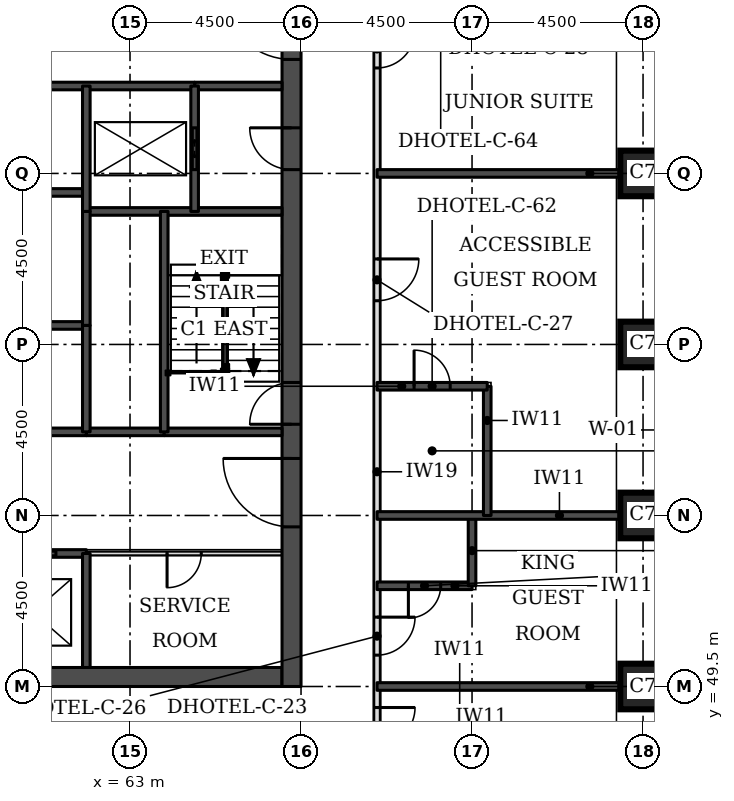
"""IFC4 building model, lengths in metres.
Left out: names, types, materials, properties, quantities, classifications, styles, units other than length and angle.
Written with IfcOpenShell. Run it as: python <this file> out.ifc"""

import sys

from ifc_helpers import new_model, si_unit, direction, frame, frame_2d, origin, origin_2d, place, context, subcontext, project, spatial, rectangle, extrude, element, fill, save


model = new_model("IFC4")
c1 = context("Model", 3, precision=1e-05, world=origin(), true_north=direction((0.0, 1.0)))
c2 = subcontext(c1, "Body", "Model", "MODEL_VIEW")
j1 = project(units=[si_unit("LENGTHUNIT", "METRE"), si_unit("PLANEANGLEUNIT", "RADIAN")], contexts=[c1])
p1 = place(None, origin())
s1 = spatial("IfcSite", under=j1, at=p1, CompositionType="ELEMENT")
p2 = place(p1, origin())
s2 = spatial("IfcBuilding", under=s1, at=p2, CompositionType="ELEMENT")
p3 = place(p2, frame((0.0, 0.0, 33.0)))
s3 = spatial("IfcBuildingStorey", under=s2, at=p3, CompositionType="ELEMENT", Elevation=33.0)
for number, where, z_axis, x_axis in (
    (1, (76.5, 49.5, 0.0), (0.0, 0.0, 1.0), (1.0, 0.0, 0.0)),
    (2, (76.5, 54.0, 0.0), (0.0, 0.0, 1.0), (1.0, 0.0, 0.0)),
    (3, (76.5, 58.5, 0.0), (0.0, 0.0, 1.0), (1.0, 0.0, 0.0)),
    (4, (76.5, 63.0, 0.0), (0.0, 0.0, 1.0), (1.0, 0.0, 0.0)),
):
    element("IfcColumn", number, at=place(p3, frame(where, z_axis=z_axis, x_axis=x_axis)), inside=s3, PredefinedType="COLUMN", context=c2, shape_type="SweptSolid", body=[
        extrude(rectangle(XDim=1.2, YDim=1.2, at=origin_2d()), origin(), (0.0, 0.0, 1.0), 3.3),
    ])
p4 = place(p3, frame((45.5, 49.75, 0.0), z_axis=(0.0, 0.0, 1.0), x_axis=(1.0, 0.0, 0.0)))
e5 = element("IfcWall", 5, at=p4, inside=s3, PredefinedType="SHEAR", context=c2, shape_type="SweptSolid", body=[
    extrude(rectangle(XDim=21.5, YDim=0.5, at=frame_2d((10.75, 0.0))), origin(), (0.0, 0.0, 1.0), 3.3),
])
p5 = place(p3, frame((67.25, 49.5, 0.0), z_axis=(0.0, 0.0, 1.0), x_axis=(0.0, 1.0, 0.0)))
e6 = element("IfcWall", 6, at=p5, inside=s3, PredefinedType="SHEAR", context=c2, shape_type="SweptSolid", body=[
    extrude(rectangle(XDim=22.5, YDim=0.5, at=frame_2d((11.25, 0.0))), origin(), (0.0, 0.0, 1.0), 3.3),
])
p6 = place(p5, frame((4.2, 0.0, 0.0)))
e7 = element("IfcOpeningElement", 7, at=p6, cuts=e6, PredefinedType="OPENING", context=c2, shape_type="SweptSolid", body=[
    extrude(rectangle(XDim=1.8, YDim=2.1, at=frame_2d((0.9, 1.05))), frame((0.0, 0.26, 0.0), z_axis=(0.0, -1.0, 0.0), x_axis=(1.0, 0.0, 0.0)), (0.0, 0.0, 1.0), 0.52),
])
p7 = place(p5, frame((6.9, 0.0, 0.0)))
e8 = element("IfcOpeningElement", 8, at=p7, cuts=e6, PredefinedType="OPENING", context=c2, shape_type="SweptSolid", body=[
    extrude(rectangle(XDim=1.1, YDim=2.1, at=frame_2d((0.55, 1.05))), frame((0.0, 0.26, 0.0), z_axis=(0.0, -1.0, 0.0), x_axis=(1.0, 0.0, 0.0)), (0.0, 0.0, 1.0), 0.52),
])
p8 = place(p5, frame((13.6, 0.0, 0.0)))
e9 = element("IfcOpeningElement", 9, at=p8, cuts=e6, PredefinedType="OPENING", context=c2, shape_type="SweptSolid", body=[
    extrude(rectangle(XDim=1.1, YDim=2.1, at=frame_2d((0.55, 1.05))), frame((0.0, 0.26, 0.0), z_axis=(0.0, -1.0, 0.0), x_axis=(1.0, 0.0, 0.0)), (0.0, 0.0, 1.0), 0.52),
])
p9 = place(p5, frame((16.5, 0.0, 0.0)))
e10 = element("IfcOpeningElement", 10, at=p9, cuts=e6, PredefinedType="OPENING", context=c2, shape_type="SweptSolid", body=[
    extrude(rectangle(XDim=1.8, YDim=2.1, at=frame_2d((0.9, 1.05))), frame((0.0, 0.26, 0.0), z_axis=(0.0, -1.0, 0.0), x_axis=(1.0, 0.0, 0.0)), (0.0, 0.0, 1.0), 0.52),
])
p10 = place(p3, frame((69.5, 47.5, 0.0), z_axis=(0.0, 0.0, 1.0), x_axis=(0.0, 1.0, 0.0)))
e11 = element("IfcWall", 11, at=p10, inside=s3, PredefinedType="PARTITIONING", context=c2, shape_type="SweptSolid", body=[
    extrude(rectangle(XDim=26.5, YDim=0.15, at=frame_2d((13.25, 0.0))), origin(), (0.0, 0.0, 1.0), 3.08),
])
p11 = place(p10, frame((25.053, 0.0, 0.0)))
e12 = element("IfcOpeningElement", 12, at=p11, cuts=e11, PredefinedType="OPENING", context=c2, shape_type="SweptSolid", body=[
    extrude(rectangle(XDim=1.0, YDim=2.1, at=frame_2d((0.5, 1.05))), frame((0.0, 0.085, 0.0), z_axis=(0.0, -1.0, 0.0), x_axis=(1.0, 0.0, 0.0)), (0.0, 0.0, 1.0), 0.17),
])
p12 = place(p10, frame((18.275, 0.0, 0.0)))
e13 = element("IfcOpeningElement", 13, at=p12, cuts=e11, PredefinedType="OPENING", context=c2, shape_type="SweptSolid", body=[
    extrude(rectangle(XDim=1.0, YDim=2.1, at=frame_2d((0.5, 1.05))), frame((0.0, 0.085, 0.0), z_axis=(0.0, -1.0, 0.0), x_axis=(1.0, 0.0, 0.0)), (0.0, 0.0, 1.0), 0.17),
])
p13 = place(p10, frame((12.15, 0.0, 0.0)))
e14 = element("IfcOpeningElement", 14, at=p13, cuts=e11, PredefinedType="OPENING", context=c2, shape_type="SweptSolid", body=[
    extrude(rectangle(XDim=1.1, YDim=2.1, at=frame_2d((0.55, 1.05))), frame((0.0, 0.085, 0.0), z_axis=(0.0, -1.0, 0.0), x_axis=(1.0, 0.0, 0.0)), (0.0, 0.0, 1.0), 0.17),
])
p14 = place(p10, frame((2.825, 0.0, 0.0)))
e15 = element("IfcOpeningElement", 15, at=p14, cuts=e11, PredefinedType="OPENING", context=c2, shape_type="SweptSolid", body=[
    extrude(rectangle(XDim=1.0, YDim=2.1, at=frame_2d((0.5, 1.05))), frame((0.0, 0.085, 0.0), z_axis=(0.0, -1.0, 0.0), x_axis=(1.0, 0.0, 0.0)), (0.0, 0.0, 1.0), 0.17),
])
p15 = place(p10, frame((0.447, 0.0, 0.0)))
e16 = element("IfcOpeningElement", 16, at=p15, cuts=e11, PredefinedType="OPENING", context=c2, shape_type="SweptSolid", body=[
    extrude(rectangle(XDim=1.0, YDim=2.1, at=frame_2d((0.5, 1.05))), frame((0.0, 0.085, 0.0), z_axis=(0.0, -1.0, 0.0), x_axis=(1.0, 0.0, 0.0)), (0.0, 0.0, 1.0), 0.17),
])
p16 = place(p3, frame((69.5, 49.5, 0.0), z_axis=(0.0, 0.0, 1.0), x_axis=(1.0, 0.0, 0.0)))
e17 = element("IfcWall", 17, at=p16, inside=s3, PredefinedType="SOLIDWALL", context=c2, shape_type="SweptSolid", body=[
    extrude(rectangle(XDim=6.4, YDim=0.2, at=frame_2d((3.2, 0.0))), origin(), (0.0, 0.0, 1.0), 3.08),
])
p17 = place(p3, frame((69.5, 52.15, 0.0), z_axis=(0.0, 0.0, 1.0), x_axis=(1.0, 0.0, 0.0)))
e18 = element("IfcWall", 18, at=p17, inside=s3, PredefinedType="SOLIDWALL", context=c2, shape_type="SweptSolid", body=[
    extrude(rectangle(XDim=2.5, YDim=0.2, at=frame_2d((1.25, 0.0))), origin(), (0.0, 0.0, 1.0), 3.08),
])
p18 = place(p17, frame((0.825, 0.0, 0.0)))
e19 = element("IfcOpeningElement", 19, at=p18, cuts=e18, PredefinedType="OPENING", context=c2, shape_type="SweptSolid", body=[
    extrude(rectangle(XDim=0.85, YDim=2.1, at=frame_2d((0.425, 1.05))), frame((0.0, 0.11, 0.0), z_axis=(0.0, -1.0, 0.0), x_axis=(1.0, 0.0, 0.0)), (0.0, 0.0, 1.0), 0.22),
])
p19 = place(p3, frame((72.0, 52.15, 0.0), z_axis=(0.0, 0.0, 1.0), x_axis=(0.0, 1.0, 0.0)))
e20 = element("IfcWall", 20, at=p19, inside=s3, PredefinedType="SOLIDWALL", context=c2, shape_type="SweptSolid", body=[
    extrude(rectangle(XDim=1.85, YDim=0.2, at=frame_2d((0.925, 0.0))), origin(), (0.0, 0.0, 1.0), 3.08),
])
p20 = place(p3, frame((69.5, 54.0, 0.0), z_axis=(0.0, 0.0, 1.0), x_axis=(1.0, 0.0, 0.0)))
e21 = element("IfcWall", 21, at=p20, inside=s3, PredefinedType="SOLIDWALL", context=c2, shape_type="SweptSolid", body=[
    extrude(rectangle(XDim=6.4, YDim=0.2, at=frame_2d((3.2, 0.0))), origin(), (0.0, 0.0, 1.0), 3.08),
])
p21 = place(p3, frame((72.4, 54.0, 0.0), z_axis=(0.0, 0.0, 1.0), x_axis=(0.0, 1.0, 0.0)))
e22 = element("IfcWall", 22, at=p21, inside=s3, PredefinedType="SOLIDWALL", context=c2, shape_type="SweptSolid", body=[
    extrude(rectangle(XDim=3.4, YDim=0.2, at=frame_2d((1.7, 0.0))), origin(), (0.0, 0.0, 1.0), 3.08),
])
p22 = place(p3, frame((69.5, 57.4, 0.0), z_axis=(0.0, 0.0, 1.0), x_axis=(1.0, 0.0, 0.0)))
e23 = element("IfcWall", 23, at=p22, inside=s3, PredefinedType="SOLIDWALL", context=c2, shape_type="SweptSolid", body=[
    extrude(rectangle(XDim=2.9, YDim=0.2, at=frame_2d((1.45, 0.0))), origin(), (0.0, 0.0, 1.0), 3.08),
])
p23 = place(p22, frame((0.975, 0.0, 0.0)))
e24 = element("IfcOpeningElement", 24, at=p23, cuts=e23, PredefinedType="OPENING", context=c2, shape_type="SweptSolid", body=[
    extrude(rectangle(XDim=0.95, YDim=2.1, at=frame_2d((0.475, 1.05))), frame((0.0, 0.11, 0.0), z_axis=(0.0, -1.0, 0.0), x_axis=(1.0, 0.0, 0.0)), (0.0, 0.0, 1.0), 0.22),
])
p24 = place(p3, frame((69.5, 63.0, 0.0), z_axis=(0.0, 0.0, 1.0), x_axis=(1.0, 0.0, 0.0)))
e25 = element("IfcWall", 25, at=p24, inside=s3, PredefinedType="SOLIDWALL", context=c2, shape_type="SweptSolid", body=[
    extrude(rectangle(XDim=6.4, YDim=0.2, at=frame_2d((3.2, 0.0))), origin(), (0.0, 0.0, 1.0), 3.08),
])
p25 = place(p3, frame((61.85, 53.0, 0.0), z_axis=(0.0, 0.0, 1.0), x_axis=(1.0, 0.0, 0.0)))
e26 = element("IfcWall", 26, at=p25, inside=s3, PredefinedType="PARTITIONING", context=c2, shape_type="SweptSolid", body=[
    extrude(rectangle(XDim=5.15, YDim=0.1, at=frame_2d((2.575, 0.0))), origin(), (0.0, 0.0, 1.0), 3.08),
])
p26 = place(p25, frame((2.125, 0.0, 0.0)))
e27 = element("IfcOpeningElement", 27, at=p26, cuts=e26, PredefinedType="OPENING", context=c2, shape_type="SweptSolid", body=[
    extrude(rectangle(XDim=0.9, YDim=2.1, at=frame_2d((0.45, 1.05))), frame((0.0, 0.06, 0.0), z_axis=(0.0, -1.0, 0.0), x_axis=(1.0, 0.0, 0.0)), (0.0, 0.0, 1.0), 0.12),
])
p27 = place(p3, frame((50.65, 53.0, 0.0), z_axis=(0.0, 0.0, 1.0), x_axis=(1.0, 0.0, 0.0)))
e28 = element("IfcWall", 28, at=p27, inside=s3, PredefinedType="SOLIDWALL", context=c2, shape_type="SweptSolid", body=[
    extrude(rectangle(XDim=11.2, YDim=0.2, at=frame_2d((5.6, 0.0))), origin(), (0.0, 0.0, 1.0), 3.08),
])
p28 = place(p27, frame((0.8, 0.0, 0.0)))
e29 = element("IfcOpeningElement", 29, at=p28, cuts=e28, PredefinedType="OPENING", context=c2, shape_type="SweptSolid", body=[
    extrude(rectangle(XDim=1.2, YDim=2.1, at=frame_2d((0.6, 1.05))), frame((0.0, 0.11, 0.0), z_axis=(0.0, -1.0, 0.0), x_axis=(1.0, 0.0, 0.0)), (0.0, 0.0, 1.0), 0.22),
])
p29 = place(p27, frame((3.6, 0.0, 0.0)))
e30 = element("IfcOpeningElement", 30, at=p29, cuts=e28, PredefinedType="OPENING", context=c2, shape_type="SweptSolid", body=[
    extrude(rectangle(XDim=1.2, YDim=2.1, at=frame_2d((0.6, 1.05))), frame((0.0, 0.11, 0.0), z_axis=(0.0, -1.0, 0.0), x_axis=(1.0, 0.0, 0.0)), (0.0, 0.0, 1.0), 0.22),
])
p30 = place(p27, frame((6.4, 0.0, 0.0)))
e31 = element("IfcOpeningElement", 31, at=p30, cuts=e28, PredefinedType="OPENING", context=c2, shape_type="SweptSolid", body=[
    extrude(rectangle(XDim=1.2, YDim=2.1, at=frame_2d((0.6, 1.05))), frame((0.0, 0.11, 0.0), z_axis=(0.0, -1.0, 0.0), x_axis=(1.0, 0.0, 0.0)), (0.0, 0.0, 1.0), 0.22),
])
p31 = place(p27, frame((9.2, 0.0, 0.0)))
e32 = element("IfcOpeningElement", 32, at=p31, cuts=e28, PredefinedType="OPENING", context=c2, shape_type="SweptSolid", body=[
    extrude(rectangle(XDim=1.2, YDim=2.1, at=frame_2d((0.6, 1.05))), frame((0.0, 0.11, 0.0), z_axis=(0.0, -1.0, 0.0), x_axis=(1.0, 0.0, 0.0)), (0.0, 0.0, 1.0), 0.22),
])
p32 = place(p3, frame((61.85, 56.2, 0.0), z_axis=(0.0, 0.0, 1.0), x_axis=(1.0, 0.0, 0.0)))
e33 = element("IfcWall", 33, at=p32, inside=s3, PredefinedType="SOLIDWALL", context=c2, shape_type="SweptSolid", body=[
    extrude(rectangle(XDim=2.05, YDim=0.2, at=frame_2d((1.025, 0.0))), origin(), (0.0, 0.0, 1.0), 3.08),
])
p33 = place(p3, frame((50.65, 56.2, 0.0), z_axis=(0.0, 0.0, 1.0), x_axis=(1.0, 0.0, 0.0)))
e34 = element("IfcWall", 34, at=p33, inside=s3, PredefinedType="SOLIDWALL", context=c2, shape_type="SweptSolid", body=[
    extrude(rectangle(XDim=11.2, YDim=0.2, at=frame_2d((5.6, 0.0))), origin(), (0.0, 0.0, 1.0), 3.08),
])
p34 = place(p3, frame((63.9, 56.2, 0.0), z_axis=(0.0, 0.0, 1.0), x_axis=(1.0, 0.0, 0.0)))
e35 = element("IfcWall", 35, at=p34, inside=s3, PredefinedType="SOLIDWALL", context=c2, shape_type="SweptSolid", body=[
    extrude(rectangle(XDim=3.1, YDim=0.2, at=frame_2d((1.55, 0.0))), origin(), (0.0, 0.0, 1.0), 3.08),
])
p35 = place(p3, frame((50.65, 59.0, 0.0), z_axis=(0.0, 0.0, 1.0), x_axis=(1.0, 0.0, 0.0)))
e36 = element("IfcWall", 36, at=p35, inside=s3, PredefinedType="SOLIDWALL", context=c2, shape_type="SweptSolid", body=[
    extrude(rectangle(XDim=11.2, YDim=0.2, at=frame_2d((5.6, 0.0))), origin(), (0.0, 0.0, 1.0), 3.3),
])
p36 = place(p3, frame((61.85, 62.0, 0.0), z_axis=(0.0, 0.0, 1.0), x_axis=(1.0, 0.0, 0.0)))
e37 = element("IfcWall", 37, at=p36, inside=s3, PredefinedType="SOLIDWALL", context=c2, shape_type="SweptSolid", body=[
    extrude(rectangle(XDim=5.15, YDim=0.2, at=frame_2d((2.575, 0.0))), origin(), (0.0, 0.0, 1.0), 3.08),
])
p37 = place(p3, frame((50.65, 62.5, 0.0), z_axis=(0.0, 0.0, 1.0), x_axis=(1.0, 0.0, 0.0)))
e38 = element("IfcWall", 38, at=p37, inside=s3, PredefinedType="SOLIDWALL", context=c2, shape_type="SweptSolid", body=[
    extrude(rectangle(XDim=11.2, YDim=0.2, at=frame_2d((5.6, 0.0))), origin(), (0.0, 0.0, 1.0), 3.3),
])
p38 = place(p3, frame((64.7, 65.3, 0.0), z_axis=(0.0, 0.0, 1.0), x_axis=(1.0, 0.0, 0.0)))
e39 = element("IfcWall", 39, at=p38, inside=s3, PredefinedType="SOLIDWALL", context=c2, shape_type="SweptSolid", body=[
    extrude(rectangle(XDim=2.3, YDim=0.2, at=frame_2d((1.15, 0.0))), origin(), (0.0, 0.0, 1.0), 3.08),
])
p39 = place(p3, frame((47.8, 65.3, 0.0), z_axis=(0.0, 0.0, 1.0), x_axis=(1.0, 0.0, 0.0)))
e40 = element("IfcWall", 40, at=p39, inside=s3, PredefinedType="SOLIDWALL", context=c2, shape_type="SweptSolid", body=[
    extrude(rectangle(XDim=16.9, YDim=0.2, at=frame_2d((8.45, 0.0))), origin(), (0.0, 0.0, 1.0), 3.08),
])
p40 = place(p3, frame((61.85, 59.0, 0.0), z_axis=(0.0, 0.0, 1.0), x_axis=(0.0, 1.0, 0.0)))
e41 = element("IfcWall", 41, at=p40, inside=s3, PredefinedType="SOLIDWALL", context=c2, shape_type="SweptSolid", body=[
    extrude(rectangle(XDim=3.0, YDim=0.2, at=frame_2d((1.5, 0.0))), origin(), (0.0, 0.0, 1.0), 3.3),
])
p41 = place(p3, frame((61.85, 50.0, 0.0), z_axis=(0.0, 0.0, 1.0), x_axis=(0.0, 1.0, 0.0)))
e42 = element("IfcWall", 42, at=p41, inside=s3, PredefinedType="SOLIDWALL", context=c2, shape_type="SweptSolid", body=[
    extrude(rectangle(XDim=3.0, YDim=0.2, at=frame_2d((1.5, 0.0))), origin(), (0.0, 0.0, 1.0), 3.08),
])
p42 = place(p3, frame((61.85, 56.2, 0.0), z_axis=(0.0, 0.0, 1.0), x_axis=(0.0, 1.0, 0.0)))
e43 = element("IfcWall", 43, at=p42, inside=s3, PredefinedType="SOLIDWALL", context=c2, shape_type="SweptSolid", body=[
    extrude(rectangle(XDim=2.8, YDim=0.2, at=frame_2d((1.4, 0.0))), origin(), (0.0, 0.0, 1.0), 3.08),
])
p43 = place(p3, frame((61.85, 62.0, 0.0), z_axis=(0.0, 0.0, 1.0), x_axis=(0.0, 1.0, 0.0)))
e44 = element("IfcWall", 44, at=p43, inside=s3, PredefinedType="SOLIDWALL", context=c2, shape_type="SweptSolid", body=[
    extrude(rectangle(XDim=3.3, YDim=0.2, at=frame_2d((1.65, 0.0))), origin(), (0.0, 0.0, 1.0), 3.08),
])
p44 = place(p3, frame((63.9, 56.2, 0.0), z_axis=(0.0, 0.0, 1.0), x_axis=(0.0, 1.0, 0.0)))
e45 = element("IfcWall", 45, at=p44, inside=s3, PredefinedType="SOLIDWALL", context=c2, shape_type="SweptSolid", body=[
    extrude(rectangle(XDim=5.8, YDim=0.2, at=frame_2d((2.9, 0.0))), origin(), (0.0, 0.0, 1.0), 3.08),
])
p45 = place(p3, frame((64.7, 62.0, 0.0), z_axis=(0.0, 0.0, 1.0), x_axis=(0.0, 1.0, 0.0)))
e46 = element("IfcWall", 46, at=p45, inside=s3, PredefinedType="SOLIDWALL", context=c2, shape_type="SweptSolid", body=[
    extrude(rectangle(XDim=3.3, YDim=0.2, at=frame_2d((1.65, 0.0))), origin(), (0.0, 0.0, 1.0), 3.08),
])
p46 = place(p45, frame((1.1, 0.0, 0.0)))
e47 = element("IfcOpeningElement", 47, at=p46, cuts=e46, PredefinedType="OPENING", context=c2, shape_type="SweptSolid", body=[
    extrude(rectangle(XDim=1.1, YDim=2.1, at=frame_2d((0.55, 1.05))), frame((0.0, 0.11, 0.0), z_axis=(0.0, -1.0, 0.0), x_axis=(1.0, 0.0, 0.0)), (0.0, 0.0, 1.0), 0.22),
])
p47 = place(p12, frame((1.0, 0.0, 0.0), z_axis=(0.0, 0.0, 1.0), x_axis=(-1.0, 0.0, 0.0)))
e48 = element("IfcDoor", 48, at=p47, inside=s3, OperationType="SINGLE_SWING_LEFT", PredefinedType="DOOR", context=c2, shape_type="SweptSolid", body=[
    extrude(rectangle(XDim=1.0, YDim=2.1, at=frame_2d((0.5, 1.05))), frame((0.0, 0.025, 0.0), z_axis=(0.0, -1.0, 0.0), x_axis=(1.0, 0.0, 0.0)), (0.0, 0.0, 1.0), 0.05),
])
fill(e13, e48)
p48 = place(p13, frame((1.1, 0.0, 0.0), z_axis=(0.0, 0.0, 1.0), x_axis=(-1.0, 0.0, 0.0)))
e49 = element("IfcDoor", 49, at=p48, inside=s3, OperationType="SINGLE_SWING_LEFT", PredefinedType="DOOR", context=c2, shape_type="SweptSolid", body=[
    extrude(rectangle(XDim=1.1, YDim=2.1, at=frame_2d((0.55, 1.05))), frame((0.0, 0.025, 0.0), z_axis=(0.0, -1.0, 0.0), x_axis=(1.0, 0.0, 0.0)), (0.0, 0.0, 1.0), 0.05),
])
fill(e14, e49)
p49 = place(p23, origin())
e50 = element("IfcDoor", 50, at=p49, inside=s3, OperationType="SINGLE_SWING_LEFT", PredefinedType="DOOR", context=c2, shape_type="SweptSolid", body=[
    extrude(rectangle(XDim=0.95, YDim=2.1, at=frame_2d((0.475, 1.05))), frame((0.0, 0.025, 0.0), z_axis=(0.0, -1.0, 0.0), x_axis=(1.0, 0.0, 0.0)), (0.0, 0.0, 1.0), 0.05),
])
fill(e24, e50)
p50 = place(p14, frame((1.0, 0.0, 0.0), z_axis=(0.0, 0.0, 1.0), x_axis=(-1.0, 0.0, 0.0)))
e51 = element("IfcDoor", 51, at=p50, inside=s3, OperationType="SINGLE_SWING_LEFT", PredefinedType="DOOR", context=c2, shape_type="SweptSolid", body=[
    extrude(rectangle(XDim=1.0, YDim=2.1, at=frame_2d((0.5, 1.05))), frame((0.0, 0.025, 0.0), z_axis=(0.0, -1.0, 0.0), x_axis=(1.0, 0.0, 0.0)), (0.0, 0.0, 1.0), 0.05),
])
fill(e15, e51)
p51 = place(p18, frame((0.85, 0.0, 0.0), z_axis=(0.0, 0.0, 1.0), x_axis=(-1.0, 0.0, 0.0)))
e52 = element("IfcDoor", 52, at=p51, inside=s3, OperationType="SINGLE_SWING_RIGHT", PredefinedType="DOOR", context=c2, shape_type="SweptSolid", body=[
    extrude(rectangle(XDim=0.85, YDim=2.1, at=frame_2d((0.425, 1.05))), frame((0.0, 0.025, 0.0), z_axis=(0.0, -1.0, 0.0), x_axis=(1.0, 0.0, 0.0)), (0.0, 0.0, 1.0), 0.05),
])
fill(e19, e52)
p52 = place(p15, frame((1.0, 0.0, 0.0), z_axis=(0.0, 0.0, 1.0), x_axis=(-1.0, 0.0, 0.0)))
e53 = element("IfcDoor", 53, at=p52, inside=s3, OperationType="SINGLE_SWING_LEFT", PredefinedType="DOOR", context=c2, shape_type="SweptSolid", body=[
    extrude(rectangle(XDim=1.0, YDim=2.1, at=frame_2d((0.5, 1.05))), frame((0.0, 0.025, 0.0), z_axis=(0.0, -1.0, 0.0), x_axis=(1.0, 0.0, 0.0)), (0.0, 0.0, 1.0), 0.05),
])
fill(e16, e53)
p53 = place(p31, origin())
e54 = element("IfcDoor", 54, at=p53, inside=s3, OperationType="DOUBLE_DOOR_SLIDING", PredefinedType="DOOR", context=c2, shape_type="SweptSolid", body=[
    extrude(rectangle(XDim=1.2, YDim=2.1, at=frame_2d((0.6, 1.05))), frame((0.0, 0.025, 0.0), z_axis=(0.0, -1.0, 0.0), x_axis=(1.0, 0.0, 0.0)), (0.0, 0.0, 1.0), 0.05),
])
fill(e32, e54)
p54 = place(p46, origin())
e55 = element("IfcDoor", 55, at=p54, inside=s3, OperationType="DOUBLE_DOOR_SLIDING", PredefinedType="DOOR", context=c2, shape_type="SweptSolid", body=[
    extrude(rectangle(XDim=1.1, YDim=2.1, at=frame_2d((0.55, 1.05))), frame((0.0, 0.025, 0.0), z_axis=(0.0, -1.0, 0.0), x_axis=(1.0, 0.0, 0.0)), (0.0, 0.0, 1.0), 0.05),
])
fill(e47, e55)
p55 = place(p6, origin())
e56 = element("IfcDoor", 56, at=p55, inside=s3, OperationType="SINGLE_SWING_RIGHT", PredefinedType="DOOR", context=c2, shape_type="SweptSolid", body=[
    extrude(rectangle(XDim=1.8, YDim=2.1, at=frame_2d((0.9, 1.05))), frame((0.0, 0.025, 0.0), z_axis=(0.0, -1.0, 0.0), x_axis=(1.0, 0.0, 0.0)), (0.0, 0.0, 1.0), 0.05),
])
fill(e7, e56)
p56 = place(p7, origin())
e57 = element("IfcDoor", 57, at=p56, inside=s3, OperationType="SINGLE_SWING_LEFT", PredefinedType="DOOR", context=c2, shape_type="SweptSolid", body=[
    extrude(rectangle(XDim=1.1, YDim=2.1, at=frame_2d((0.55, 1.05))), frame((0.0, 0.025, 0.0), z_axis=(0.0, -1.0, 0.0), x_axis=(1.0, 0.0, 0.0)), (0.0, 0.0, 1.0), 0.05),
])
fill(e8, e57)
p57 = place(p8, origin())
e58 = element("IfcDoor", 58, at=p57, inside=s3, OperationType="SINGLE_SWING_RIGHT", PredefinedType="DOOR", context=c2, shape_type="SweptSolid", body=[
    extrude(rectangle(XDim=1.1, YDim=2.1, at=frame_2d((0.55, 1.05))), frame((0.0, 0.025, 0.0), z_axis=(0.0, -1.0, 0.0), x_axis=(1.0, 0.0, 0.0)), (0.0, 0.0, 1.0), 0.05),
])
fill(e9, e58)
p58 = place(p9, origin())
e59 = element("IfcDoor", 59, at=p58, inside=s3, OperationType="SINGLE_SWING_RIGHT", PredefinedType="DOOR", context=c2, shape_type="SweptSolid", body=[
    extrude(rectangle(XDim=1.8, YDim=2.1, at=frame_2d((0.9, 1.05))), frame((0.0, 0.025, 0.0), z_axis=(0.0, -1.0, 0.0), x_axis=(1.0, 0.0, 0.0)), (0.0, 0.0, 1.0), 0.05),
])
fill(e10, e59)
p59 = place(p26, frame((0.9, 0.0, 0.0), z_axis=(0.0, 0.0, 1.0), x_axis=(-1.0, 0.0, 0.0)))
e60 = element("IfcDoor", 60, at=p59, inside=s3, OperationType="SINGLE_SWING_RIGHT", PredefinedType="DOOR", context=c2, shape_type="SweptSolid", body=[
    extrude(rectangle(XDim=0.9, YDim=2.1, at=frame_2d((0.45, 1.05))), frame((0.0, 0.025, 0.0), z_axis=(0.0, -1.0, 0.0), x_axis=(1.0, 0.0, 0.0)), (0.0, 0.0, 1.0), 0.05),
])
fill(e27, e60)
save(model, sys.argv[1])
